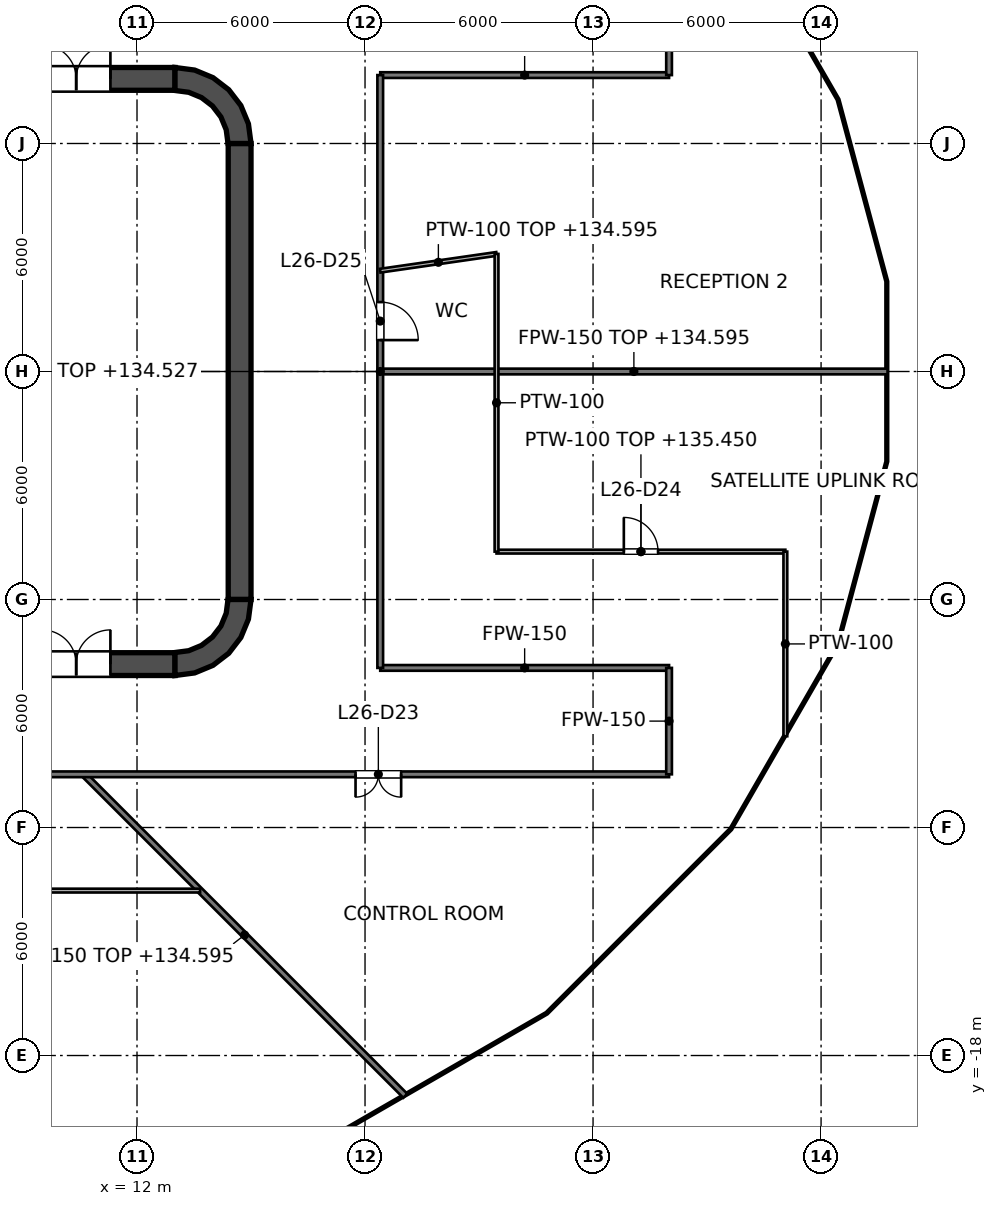
"""IFC4 building model, lengths in metres.
Left out: names, types, materials, properties, quantities, classifications, styles, units other than length and angle.
Written with IfcOpenShell. Run it as: python <this file> out.ifc"""

import sys

from ifc_helpers import new_model, si_unit, direction, frame, frame_2d, origin, place, context, subcontext, project, spatial, polyline, rectangle, outline, extrude, element, fill, save


model = new_model("IFC4")
c1 = context("Model", 3, precision=1e-05, world=origin(), true_north=direction((0.0, 1.0)))
c2 = subcontext(c1, "Body", "Model", "MODEL_VIEW")
j1 = project(units=[si_unit("LENGTHUNIT", "METRE"), si_unit("PLANEANGLEUNIT", "RADIAN")], contexts=[c1])
p1 = place(None, origin())
s1 = spatial("IfcSite", under=j1, at=p1, CompositionType="ELEMENT")
p2 = place(p1, origin())
s2 = spatial("IfcBuilding", under=s1, at=p2, CompositionType="ELEMENT")
p3 = place(p2, frame((0.0, 0.0, 131.4)))
s3 = spatial("IfcBuildingStorey", under=s2, at=p3, CompositionType="ELEMENT", Elevation=131.4)
p4 = place(p3, frame((-13.0, 7.7, 0.0), z_axis=(0.0, 0.0, 1.0), x_axis=(1.0, 0.0, 0.0)))
e1 = element("IfcWall", 1, at=p4, inside=s3, PredefinedType="SHEAR", context=c2, shape_type="SweptSolid", body=[
    extrude(rectangle(XDim=26.0, YDim=0.6, at=frame_2d((13.0, 0.0))), origin(), (0.0, 0.0, 1.0), 4.2),
])
p5 = place(p4, frame((1.7, 0.0, 0.0)))
e2 = element("IfcOpeningElement", 2, at=p5, cuts=e1, PredefinedType="OPENING", context=c2, shape_type="SweptSolid", body=[
    extrude(rectangle(XDim=1.8, YDim=2.1, at=frame_2d((0.9, 1.05))), frame((0.0, 0.3, 0.0), z_axis=(0.0, -1.0, 0.0), x_axis=(1.0, 0.0, 0.0)), (0.0, 0.0, 1.0), 0.6),
])
p6 = place(p4, frame((22.5, 0.0, 0.0)))
e3 = element("IfcOpeningElement", 3, at=p6, cuts=e1, PredefinedType="OPENING", context=c2, shape_type="SweptSolid", body=[
    extrude(rectangle(XDim=1.8, YDim=2.1, at=frame_2d((0.9, 1.05))), frame((0.0, 0.3, 0.0), z_axis=(0.0, -1.0, 0.0), x_axis=(1.0, 0.0, 0.0)), (0.0, 0.0, 1.0), 0.6),
])
p7 = place(p3, frame((-13.0, -7.7, 0.0), z_axis=(0.0, 0.0, 1.0), x_axis=(1.0, 0.0, 0.0)))
e4 = element("IfcWall", 4, at=p7, inside=s3, PredefinedType="SHEAR", context=c2, shape_type="SweptSolid", body=[
    extrude(rectangle(XDim=26.0, YDim=0.6, at=frame_2d((13.0, 0.0))), origin(), (0.0, 0.0, 1.0), 4.2),
])
p8 = place(p7, frame((1.7, 0.0, 0.0)))
e5 = element("IfcOpeningElement", 5, at=p8, cuts=e4, PredefinedType="OPENING", context=c2, shape_type="SweptSolid", body=[
    extrude(rectangle(XDim=1.8, YDim=2.1, at=frame_2d((0.9, 1.05))), frame((0.0, 0.3, 0.0), z_axis=(0.0, -1.0, 0.0), x_axis=(1.0, 0.0, 0.0)), (0.0, 0.0, 1.0), 0.6),
])
p9 = place(p7, frame((22.5, 0.0, 0.0)))
e6 = element("IfcOpeningElement", 6, at=p9, cuts=e4, PredefinedType="OPENING", context=c2, shape_type="SweptSolid", body=[
    extrude(rectangle(XDim=1.8, YDim=2.1, at=frame_2d((0.9, 1.05))), frame((0.0, 0.3, 0.0), z_axis=(0.0, -1.0, 0.0), x_axis=(1.0, 0.0, 0.0)), (0.0, 0.0, 1.0), 0.6),
])
p10 = place(p3, frame((14.7, -6.0, 0.0), z_axis=(0.0, 0.0, 1.0), x_axis=(0.0, 1.0, 0.0)))
e7 = element("IfcWall", 7, at=p10, inside=s3, PredefinedType="SHEAR", context=c2, shape_type="SweptSolid", body=[
    extrude(rectangle(XDim=12.0, YDim=0.6, at=frame_2d((6.0, 0.0))), origin(), (0.0, 0.0, 1.0), 4.2),
])
p11 = place(p3, origin())
e8 = element("IfcWall", 8, at=p11, inside=s3, PredefinedType="SHEAR", context=c2, shape_type="SweptSolid", body=[
    extrude(outline(polyline([(13.0, 8.0), (13.0, 7.395), (13.361, 7.347), (13.698, 7.208), (13.986, 6.986), (14.208, 6.698), (14.347, 6.361), (14.395, 6.0), (15.0, 6.0), (14.932, 6.518), (14.732, 7.0), (14.414, 7.414), (14.0, 7.732), (13.518, 7.932), (13.0, 8.0)])), origin(), (0.0, 0.0, 1.0), 4.2),
])
e9 = element("IfcWall", 9, at=p11, inside=s3, PredefinedType="SHEAR", context=c2, shape_type="SweptSolid", body=[
    extrude(outline(polyline([(15.0, -6.0), (14.395, -6.0), (14.347, -6.361), (14.208, -6.698), (13.986, -6.986), (13.698, -7.208), (13.361, -7.347), (13.0, -7.395), (13.0, -8.0), (13.518, -7.932), (14.0, -7.732), (14.414, -7.414), (14.732, -7.0), (14.932, -6.518), (15.0, -6.0)])), origin(), (0.0, 0.0, 1.0), 4.2),
])
p12 = place(p3, frame((11.8, -7.4, 0.0), z_axis=(0.0, 0.0, 1.0), x_axis=(0.0, 1.0, 0.0)))
e10 = element("IfcWall", 10, at=p12, inside=s3, PredefinedType="SOLIDWALL", context=c2, shape_type="SweptSolid", body=[
    extrude(rectangle(XDim=14.8, YDim=0.4, at=frame_2d((7.4, 0.0))), origin(), (0.0, 0.0, 1.0), 4.05),
])
p13 = place(p12, frame((11.2, 0.0, 0.0)))
e11 = element("IfcOpeningElement", 11, at=p13, cuts=e10, PredefinedType="OPENING", context=c2, shape_type="SweptSolid", body=[
    extrude(rectangle(XDim=1.1, YDim=2.1, at=frame_2d((0.55, 1.05))), frame((0.0, 0.2, 0.0), z_axis=(0.0, -1.0, 0.0), x_axis=(1.0, 0.0, 0.0)), (0.0, 0.0, 1.0), 0.4),
])
p14 = place(p12, frame((8.3, 0.0, 0.0)))
e12 = element("IfcOpeningElement", 12, at=p14, cuts=e10, PredefinedType="OPENING", context=c2, shape_type="SweptSolid", body=[
    extrude(rectangle(XDim=1.1, YDim=2.1, at=frame_2d((0.55, 1.05))), frame((0.0, 0.2, 0.0), z_axis=(0.0, -1.0, 0.0), x_axis=(1.0, 0.0, 0.0)), (0.0, 0.0, 1.0), 0.4),
])
p15 = place(p12, frame((5.4, 0.0, 0.0)))
e13 = element("IfcOpeningElement", 13, at=p15, cuts=e10, PredefinedType="OPENING", context=c2, shape_type="SweptSolid", body=[
    extrude(rectangle(XDim=1.1, YDim=2.1, at=frame_2d((0.55, 1.05))), frame((0.0, 0.2, 0.0), z_axis=(0.0, -1.0, 0.0), x_axis=(1.0, 0.0, 0.0)), (0.0, 0.0, 1.0), 0.4),
])
p16 = place(p12, frame((13.552, 0.0, 0.0)))
e14 = element("IfcOpeningElement", 14, at=p16, cuts=e10, PredefinedType="OPENING", context=c2, shape_type="SweptSolid", body=[
    extrude(rectangle(XDim=0.9, YDim=2.1, at=frame_2d((0.45, 1.05))), frame((0.0, 0.2, 0.0), z_axis=(0.0, -1.0, 0.0), x_axis=(1.0, 0.0, 0.0)), (0.0, 0.0, 1.0), 0.4),
])
p17 = place(p12, frame((0.347, 0.0, 0.0)))
e15 = element("IfcOpeningElement", 15, at=p17, cuts=e10, PredefinedType="OPENING", context=c2, shape_type="SweptSolid", body=[
    extrude(rectangle(XDim=0.9, YDim=2.1, at=frame_2d((0.45, 1.05))), frame((0.0, 0.2, 0.0), z_axis=(0.0, -1.0, 0.0), x_axis=(1.0, 0.0, 0.0)), (0.0, 0.0, 1.0), 0.4),
])
e16 = element("IfcWall", 16, at=p11, inside=s3, PredefinedType="SOLIDWALL", context=c2, shape_type="SweptSolid", body=[
    extrude(outline(polyline([(12.0, -5.675), (12.0, -5.925), (14.15, -5.925), (14.4, -5.925), (14.4, -5.675), (14.4, -3.025), (14.4, -2.775), (14.4, -0.125), (14.4, 0.125), (14.4, 2.775), (14.4, 3.025), (14.4, 5.675), (14.4, 5.925), (14.15, 5.925), (12.0, 5.925), (12.0, 5.675), (14.15, 5.675), (14.15, 3.025), (12.0, 3.025), (12.0, 2.775), (14.15, 2.775), (14.15, 0.125), (12.0, 0.125), (12.0, -0.125), (14.15, -0.125), (14.15, -2.775), (12.0, -2.775), (12.0, -3.025), (14.15, -3.025), (14.15, -5.675), (12.0, -5.675)])), origin(), (0.0, 0.0, 1.0), 4.05),
])
p18 = place(p3, frame((10.6, -10.6, 0.0), z_axis=(0.0, 0.0, 1.0), x_axis=(0.707106781187, -0.707106781187, 0.0)))
e17 = element("IfcWall", 17, at=p18, inside=s3, PredefinedType="PARTITIONING", context=c2, shape_type="SweptSolid", body=[
    extrude(rectangle(XDim=11.963, YDim=0.15, at=frame_2d((5.981, 0.0))), origin(), (0.0, 0.0, 1.0), 3.195),
])
p19 = place(p3, frame((-26.0, -10.6, 0.0), z_axis=(0.0, 0.0, 1.0), x_axis=(1.0, 0.0, 0.0)))
e18 = element("IfcWall", 18, at=p19, inside=s3, PredefinedType="PARTITIONING", context=c2, shape_type="SweptSolid", body=[
    extrude(rectangle(XDim=52.0, YDim=0.15, at=frame_2d((26.0, 0.0))), origin(), (0.0, 0.0, 1.0), 3.127),
])
p20 = place(p19, frame((22.49, 0.0, 0.0)))
e19 = element("IfcOpeningElement", 19, at=p20, cuts=e18, PredefinedType="OPENING", context=c2, shape_type="SweptSolid", body=[
    extrude(rectangle(XDim=1.0, YDim=2.1, at=frame_2d((0.5, 1.05))), frame((0.0, 0.075, 0.0), z_axis=(0.0, -1.0, 0.0), x_axis=(1.0, 0.0, 0.0)), (0.0, 0.0, 1.0), 0.15),
])
p21 = place(p19, frame((30.8, 0.0, 0.0)))
e20 = element("IfcOpeningElement", 20, at=p21, cuts=e18, PredefinedType="OPENING", context=c2, shape_type="SweptSolid", body=[
    extrude(rectangle(XDim=1.0, YDim=2.1, at=frame_2d((0.5, 1.05))), frame((0.0, 0.075, 0.0), z_axis=(0.0, -1.0, 0.0), x_axis=(1.0, 0.0, 0.0)), (0.0, 0.0, 1.0), 0.15),
])
p22 = place(p19, frame((43.75, 0.0, 0.0)))
e21 = element("IfcOpeningElement", 21, at=p22, cuts=e18, PredefinedType="OPENING", context=c2, shape_type="SweptSolid", body=[
    extrude(rectangle(XDim=1.2, YDim=2.1, at=frame_2d((0.6, 1.05))), frame((0.0, 0.075, 0.0), z_axis=(0.0, -1.0, 0.0), x_axis=(1.0, 0.0, 0.0)), (0.0, 0.0, 1.0), 0.15),
])
p23 = place(p19, frame((9.44, 0.0, 0.0)))
e22 = element("IfcOpeningElement", 22, at=p23, cuts=e18, PredefinedType="OPENING", context=c2, shape_type="SweptSolid", body=[
    extrude(rectangle(XDim=1.0, YDim=2.1, at=frame_2d((0.5, 1.05))), frame((0.0, 0.075, 0.0), z_axis=(0.0, -1.0, 0.0), x_axis=(1.0, 0.0, 0.0)), (0.0, 0.0, 1.0), 0.15),
])
p24 = place(p3, frame((18.4, -7.8, 0.0), z_axis=(0.0, 0.0, 1.0), x_axis=(1.0, 0.0, 0.0)))
e23 = element("IfcWall", 23, at=p24, inside=s3, PredefinedType="PARTITIONING", context=c2, shape_type="SweptSolid", body=[
    extrude(rectangle(XDim=7.6, YDim=0.15, at=frame_2d((3.8, 0.0))), origin(), (0.0, 0.0, 1.0), 3.276),
])
p25 = place(p3, frame((18.4, 0.0, 0.0), z_axis=(0.0, 0.0, 1.0), x_axis=(1.0, 0.0, 0.0)))
e24 = element("IfcWall", 24, at=p25, inside=s3, PredefinedType="PARTITIONING", context=c2, shape_type="SweptSolid", body=[
    extrude(rectangle(XDim=13.349, YDim=0.15, at=frame_2d((6.675, 0.0))), origin(), (0.0, 0.0, 1.0), 3.195),
])
p26 = place(p3, frame((18.4, 7.8, 0.0), z_axis=(0.0, 0.0, 1.0), x_axis=(1.0, 0.0, 0.0)))
e25 = element("IfcWall", 25, at=p26, inside=s3, PredefinedType="PARTITIONING", context=c2, shape_type="SweptSolid", body=[
    extrude(rectangle(XDim=7.6, YDim=0.15, at=frame_2d((3.8, 0.0))), origin(), (0.0, 0.0, 1.0), 3.276),
])
for number, where, z_axis, x_axis in (
    (26, (26.0, -10.6, 0.0), (0.0, 0.0, 1.0), (0.0, 1.0, 0.0)),
    (27, (26.0, 7.8, 0.0), (0.0, 0.0, 1.0), (0.0, 1.0, 0.0)),
):
    element("IfcWall", number, at=place(p3, frame(where, z_axis=z_axis, x_axis=x_axis)), inside=s3, PredefinedType="PARTITIONING", context=c2, shape_type="SweptSolid", body=[
        extrude(rectangle(XDim=2.8, YDim=0.15, at=frame_2d((1.4, 0.0))), origin(), (0.0, 0.0, 1.0), 3.276),
    ])
p27 = place(p3, frame((18.4, -7.8, 0.0), z_axis=(0.0, 0.0, 1.0), x_axis=(0.0, 1.0, 0.0)))
e28 = element("IfcWall", 28, at=p27, inside=s3, PredefinedType="PARTITIONING", context=c2, shape_type="SweptSolid", body=[
    extrude(rectangle(XDim=15.6, YDim=0.15, at=frame_2d((7.8, 0.0))), origin(), (0.0, 0.0, 1.0), 3.127),
])
p28 = place(p27, frame((8.626, 0.0, 0.0)))
e29 = element("IfcOpeningElement", 29, at=p28, cuts=e28, PredefinedType="OPENING", context=c2, shape_type="SweptSolid", body=[
    extrude(rectangle(XDim=1.0, YDim=2.1, at=frame_2d((0.5, 1.05))), frame((0.0, 0.075, 0.0), z_axis=(0.0, -1.0, 0.0), x_axis=(1.0, 0.0, 0.0)), (0.0, 0.0, 1.0), 0.15),
])
p29 = place(p3, frame((-26.036, -13.66, 0.0), z_axis=(0.0, 0.0, 1.0), x_axis=(1.0, 0.0, 0.0)))
e30 = element("IfcWall", 30, at=p29, inside=s3, PredefinedType="PARTITIONING", context=c2, shape_type="SweptSolid", body=[
    extrude(rectangle(XDim=39.696, YDim=0.1, at=frame_2d((19.848, 0.0))), origin(), (0.0, 0.0, 1.0), 3.127),
])
p30 = place(p29, frame((31.966, 0.0, 0.0)))
e31 = element("IfcOpeningElement", 31, at=p30, cuts=e30, PredefinedType="OPENING", context=c2, shape_type="SweptSolid", body=[
    extrude(rectangle(XDim=1.8, YDim=2.1, at=frame_2d((0.9, 1.05))), frame((0.0, 0.05, 0.0), z_axis=(0.0, -1.0, 0.0), x_axis=(1.0, 0.0, 0.0)), (0.0, 0.0, 1.0), 0.1),
])
p31 = place(p29, frame((8.625, 0.0, 0.0)))
e32 = element("IfcOpeningElement", 32, at=p31, cuts=e30, PredefinedType="OPENING", context=c2, shape_type="SweptSolid", body=[
    extrude(rectangle(XDim=0.9, YDim=2.1, at=frame_2d((0.45, 1.05))), frame((0.0, 0.05, 0.0), z_axis=(0.0, -1.0, 0.0), x_axis=(1.0, 0.0, 0.0)), (0.0, 0.0, 1.0), 0.1),
])
p32 = place(p3, frame((21.46, -4.74, 0.0), z_axis=(0.0, 0.0, 1.0), x_axis=(1.0, 0.0, 0.0)))
e33 = element("IfcWall", 33, at=p32, inside=s3, PredefinedType="PARTITIONING", context=c2, shape_type="SweptSolid", body=[
    extrude(rectangle(XDim=7.6, YDim=0.1, at=frame_2d((3.8, 0.0))), origin(), (0.0, 0.0, 1.0), 4.05),
])
p33 = place(p32, frame((3.35, 0.0, 0.0)))
e34 = element("IfcOpeningElement", 34, at=p33, cuts=e33, PredefinedType="OPENING", context=c2, shape_type="SweptSolid", body=[
    extrude(rectangle(XDim=0.9, YDim=2.1, at=frame_2d((0.45, 1.05))), frame((0.0, 0.05, 0.0), z_axis=(0.0, -1.0, 0.0), x_axis=(1.0, 0.0, 0.0)), (0.0, 0.0, 1.0), 0.1),
])
p34 = place(p3, frame((18.4, 2.653, 0.0), z_axis=(0.0, 0.0, 1.0), x_axis=(0.989778203896, 0.142615241442, 0.0)))
e35 = element("IfcWall", 35, at=p34, inside=s3, PredefinedType="PARTITIONING", context=c2, shape_type="SweptSolid", body=[
    extrude(rectangle(XDim=3.092, YDim=0.1, at=frame_2d((1.546, 0.0))), origin(), (0.0, 0.0, 1.0), 3.195),
])
p35 = place(p3, frame((29.06, -9.598, 0.0), z_axis=(0.0, 0.0, 1.0), x_axis=(0.0, 1.0, 0.0)))
e36 = element("IfcWall", 36, at=p35, inside=s3, PredefinedType="PARTITIONING", context=c2, shape_type="SweptSolid", body=[
    extrude(rectangle(XDim=4.858, YDim=0.1, at=frame_2d((2.429, 0.0))), origin(), (0.0, 0.0, 1.0), 3.127),
])
p36 = place(p3, frame((21.46, -4.74, 0.0), z_axis=(0.0, 0.0, 1.0), x_axis=(0.0, 1.0, 0.0)))
e37 = element("IfcWall", 37, at=p36, inside=s3, PredefinedType="PARTITIONING", context=c2, shape_type="SweptSolid", body=[
    extrude(rectangle(XDim=7.834, YDim=0.1, at=frame_2d((3.917, 0.0))), origin(), (0.0, 0.0, 1.0), 3.127),
])
p37 = place(p13, origin())
e38 = element("IfcDoor", 38, at=p37, inside=s3, OperationType="DOUBLE_DOOR_SLIDING", PredefinedType="DOOR", context=c2, shape_type="SweptSolid", body=[
    extrude(rectangle(XDim=1.1, YDim=2.1, at=frame_2d((0.55, 1.05))), frame((0.0, 0.025, 0.0), z_axis=(0.0, -1.0, 0.0), x_axis=(1.0, 0.0, 0.0)), (0.0, 0.0, 1.0), 0.05),
])
fill(e11, e38)
p38 = place(p14, origin())
e39 = element("IfcDoor", 39, at=p38, inside=s3, OperationType="DOUBLE_DOOR_SLIDING", PredefinedType="DOOR", context=c2, shape_type="SweptSolid", body=[
    extrude(rectangle(XDim=1.1, YDim=2.1, at=frame_2d((0.55, 1.05))), frame((0.0, 0.025, 0.0), z_axis=(0.0, -1.0, 0.0), x_axis=(1.0, 0.0, 0.0)), (0.0, 0.0, 1.0), 0.05),
])
fill(e12, e39)
p39 = place(p15, origin())
e40 = element("IfcDoor", 40, at=p39, inside=s3, OperationType="DOUBLE_DOOR_SLIDING", PredefinedType="DOOR", context=c2, shape_type="SweptSolid", body=[
    extrude(rectangle(XDim=1.1, YDim=2.1, at=frame_2d((0.55, 1.05))), frame((0.0, 0.025, 0.0), z_axis=(0.0, -1.0, 0.0), x_axis=(1.0, 0.0, 0.0)), (0.0, 0.0, 1.0), 0.05),
])
fill(e13, e40)
p40 = place(p16, origin())
e41 = element("IfcDoor", 41, at=p40, inside=s3, OperationType="SINGLE_SWING_RIGHT", PredefinedType="DOOR", context=c2, shape_type="SweptSolid", body=[
    extrude(rectangle(XDim=0.9, YDim=2.1, at=frame_2d((0.45, 1.05))), frame((0.0, 0.025, 0.0), z_axis=(0.0, -1.0, 0.0), x_axis=(1.0, 0.0, 0.0)), (0.0, 0.0, 1.0), 0.05),
])
fill(e14, e41)
p41 = place(p17, origin())
e42 = element("IfcDoor", 42, at=p41, inside=s3, OperationType="SINGLE_SWING_RIGHT", PredefinedType="DOOR", context=c2, shape_type="SweptSolid", body=[
    extrude(rectangle(XDim=0.9, YDim=2.1, at=frame_2d((0.45, 1.05))), frame((0.0, 0.025, 0.0), z_axis=(0.0, -1.0, 0.0), x_axis=(1.0, 0.0, 0.0)), (0.0, 0.0, 1.0), 0.05),
])
fill(e15, e42)
p42 = place(p6, origin())
e43 = element("IfcDoor", 43, at=p42, inside=s3, OperationType="DOUBLE_DOOR_SINGLE_SWING", PredefinedType="DOOR", context=c2, shape_type="SweptSolid", body=[
    extrude(rectangle(XDim=1.8, YDim=2.1, at=frame_2d((0.9, 1.05))), frame((0.0, 0.025, 0.0), z_axis=(0.0, -1.0, 0.0), x_axis=(1.0, 0.0, 0.0)), (0.0, 0.0, 1.0), 0.05),
])
fill(e3, e43)
p43 = place(p9, origin())
e44 = element("IfcDoor", 44, at=p43, inside=s3, OperationType="DOUBLE_DOOR_SINGLE_SWING", PredefinedType="DOOR", context=c2, shape_type="SweptSolid", body=[
    extrude(rectangle(XDim=1.8, YDim=2.1, at=frame_2d((0.9, 1.05))), frame((0.0, 0.025, 0.0), z_axis=(0.0, -1.0, 0.0), x_axis=(1.0, 0.0, 0.0)), (0.0, 0.0, 1.0), 0.05),
])
fill(e6, e44)
p44 = place(p22, origin())
e45 = element("IfcDoor", 45, at=p44, inside=s3, OperationType="DOUBLE_DOOR_SINGLE_SWING", PredefinedType="DOOR", context=c2, shape_type="SweptSolid", body=[
    extrude(rectangle(XDim=1.2, YDim=2.1, at=frame_2d((0.6, 1.05))), frame((0.0, 0.025, 0.0), z_axis=(0.0, -1.0, 0.0), x_axis=(1.0, 0.0, 0.0)), (0.0, 0.0, 1.0), 0.05),
])
fill(e21, e45)
p45 = place(p33, origin())
e46 = element("IfcDoor", 46, at=p45, inside=s3, OperationType="SINGLE_SWING_LEFT", PredefinedType="DOOR", context=c2, shape_type="SweptSolid", body=[
    extrude(rectangle(XDim=0.9, YDim=2.1, at=frame_2d((0.45, 1.05))), frame((0.0, 0.025, 0.0), z_axis=(0.0, -1.0, 0.0), x_axis=(1.0, 0.0, 0.0)), (0.0, 0.0, 1.0), 0.05),
])
fill(e34, e46)
p46 = place(p28, origin())
e47 = element("IfcDoor", 47, at=p46, inside=s3, OperationType="SINGLE_SWING_LEFT", PredefinedType="DOOR", context=c2, shape_type="SweptSolid", body=[
    extrude(rectangle(XDim=1.0, YDim=2.1, at=frame_2d((0.5, 1.05))), frame((0.0, 0.025, 0.0), z_axis=(0.0, -1.0, 0.0), x_axis=(1.0, 0.0, 0.0)), (0.0, 0.0, 1.0), 0.05),
])
fill(e29, e47)
save(model, sys.argv[1])
